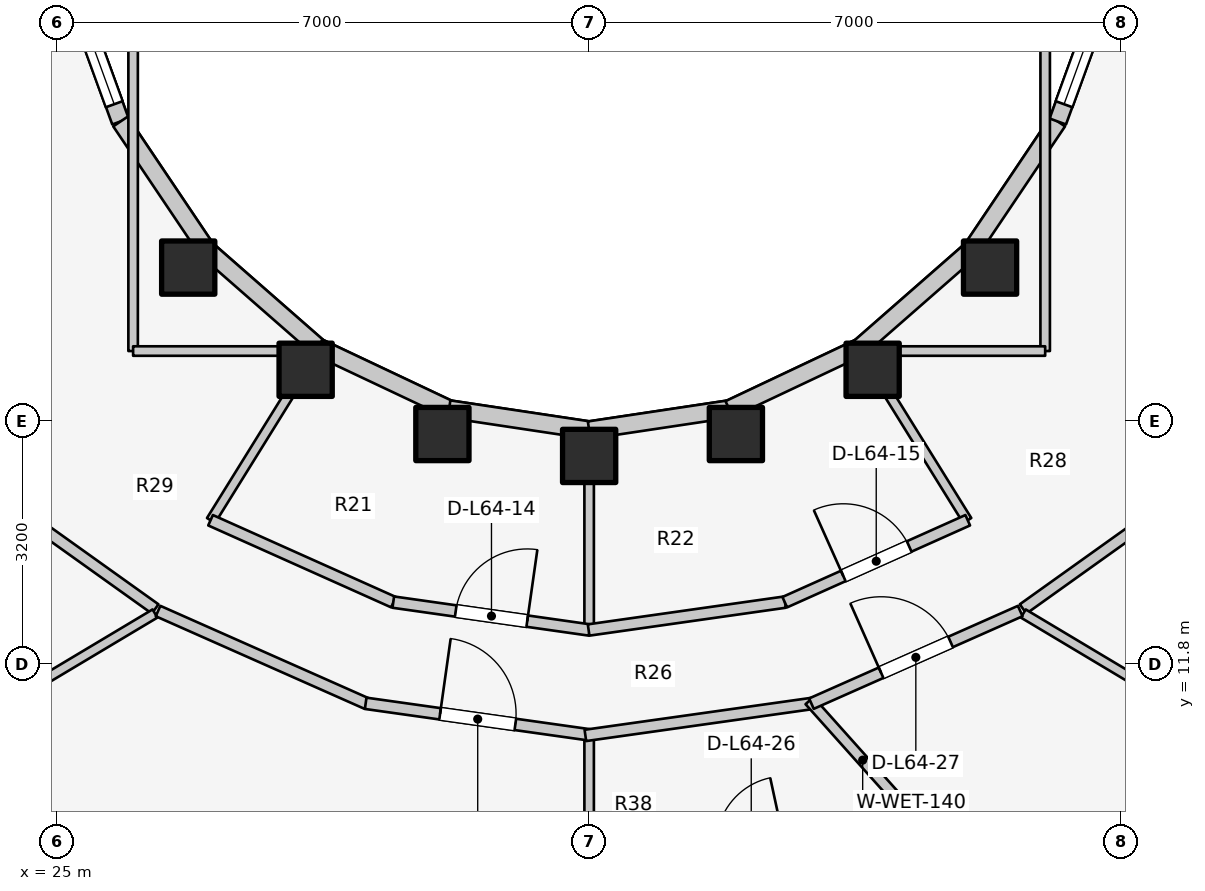
"""IFC4 building model, lengths in metres.
Left out: names, types, materials, properties, quantities, classifications, styles, units other than length and angle.
Written with IfcOpenShell. Run it as: python <this file> out.ifc"""

import sys

from ifc_helpers import new_model, si_unit, direction, frame, frame_2d, origin, origin_2d, place, context, subcontext, project, spatial, rectangle, extrude, element, fill, save


model = new_model("IFC4")
c1 = context("Model", 3, precision=1e-05, world=origin(), true_north=direction((0.0, 1.0)))
c2 = subcontext(c1, "Body", "Model", "MODEL_VIEW")
j1 = project(units=[si_unit("LENGTHUNIT", "METRE"), si_unit("PLANEANGLEUNIT", "RADIAN")], contexts=[c1])
p1 = place(None, origin())
s1 = spatial("IfcSite", under=j1, at=p1, CompositionType="ELEMENT")
p2 = place(p1, origin())
s2 = spatial("IfcBuilding", under=s1, at=p2, CompositionType="ELEMENT")
p3 = place(p2, frame((0.0, 0.0, 210.9)))
s3 = spatial("IfcBuildingStorey", under=s2, at=p3, CompositionType="ELEMENT", Elevation=210.9)
for number, where, z_axis, x_axis in (
    (1, (26.725, 17.018, 0.0), (0.0, 0.0, 1.0), (1.0, 0.0, 0.0)),
    (2, (28.27, 15.673, 0.0), (0.0, 0.0, 1.0), (1.0, 0.0, 0.0)),
    (3, (30.069, 14.828, 0.0), (0.0, 0.0, 1.0), (1.0, 0.0, 0.0)),
    (4, (32.0, 14.54, 0.0), (0.0, 0.0, 1.0), (1.0, 0.0, 0.0)),
    (5, (33.931, 14.828, 0.0), (0.0, 0.0, 1.0), (1.0, 0.0, 0.0)),
    (6, (35.73, 15.673, 0.0), (0.0, 0.0, 1.0), (1.0, 0.0, 0.0)),
    (7, (37.275, 17.018, 0.0), (0.0, 0.0, 1.0), (1.0, 0.0, 0.0)),
):
    element("IfcColumn", number, at=place(p3, frame(where, z_axis=z_axis, x_axis=x_axis)), inside=s3, PredefinedType="COLUMN", context=c2, shape_type="SweptSolid", body=[
        extrude(rectangle(XDim=0.7, YDim=0.7, at=origin_2d()), origin(), (0.0, 0.0, 1.0), 3.1),
    ])
p4 = place(p3, frame((25.123, 20.898, 0.0), z_axis=(0.0, 0.0, 1.0), x_axis=(0.341423187295, -0.93990968033, 0.0)))
e8 = element("IfcWall", 8, at=p4, inside=s3, PredefinedType="STANDARD", context=c2, shape_type="SweptSolid", body=[
    extrude(rectangle(XDim=2.084, YDim=0.23, at=frame_2d((1.042, 0.0))), origin(), (0.0, 0.0, 1.0), 2.84),
])
p5 = place(p4, frame((0.242, 0.0, 0.85)))
e9 = element("IfcOpeningElement", 9, at=p5, cuts=e8, PredefinedType="OPENING", context=c2, shape_type="SweptSolid", body=[
    extrude(rectangle(XDim=1.6, YDim=1.65, at=frame_2d((0.8, 0.825))), frame((0.0, 0.125, 0.0), z_axis=(0.0, -1.0, 0.0), x_axis=(1.0, 0.0, 0.0)), (0.0, 0.0, 1.0), 0.25),
])
p6 = place(p3, frame((25.834, 18.94, 0.0), z_axis=(0.0, 0.0, 1.0), x_axis=(0.558197800898, -0.829707909492, 0.0)))
e10 = element("IfcWall", 10, at=p6, inside=s3, PredefinedType="STANDARD", context=c2, shape_type="SweptSolid", body=[
    extrude(rectangle(XDim=2.027, YDim=0.23, at=frame_2d((1.013, 0.0))), origin(), (0.0, 0.0, 1.0), 2.16),
])
p7 = place(p3, frame((26.965, 17.258, 0.0), z_axis=(0.0, 0.0, 1.0), x_axis=(0.752576694707, -0.658504607869, 0.0)))
e11 = element("IfcWall", 11, at=p7, inside=s3, PredefinedType="STANDARD", context=c2, shape_type="SweptSolid", body=[
    extrude(rectangle(XDim=1.959, YDim=0.23, at=frame_2d((0.98, 0.0))), origin(), (0.0, 0.0, 1.0), 2.16),
])
p8 = place(p3, frame((28.44, 15.968, 0.0), z_axis=(0.0, 0.0, 1.0), x_axis=(0.904179699603, -0.427152280606, 0.0)))
e12 = element("IfcWall", 12, at=p8, inside=s3, PredefinedType="STANDARD", context=c2, shape_type="SweptSolid", body=[
    extrude(rectangle(XDim=1.899, YDim=0.23, at=frame_2d((0.95, 0.0))), origin(), (0.0, 0.0, 1.0), 2.16),
])
for number, where, z_axis, x_axis in (
    (13, (30.157, 15.157, 0.0), (0.0, 0.0, 1.0), (0.989, -0.149, 0.0)),
    (14, (32.0, 14.88, 0.0), (0.0, 0.0, 1.0), (0.989, 0.149, 0.0)),
):
    element("IfcWall", number, at=place(p3, frame(where, z_axis=z_axis, x_axis=x_axis)), inside=s3, PredefinedType="STANDARD", context=c2, shape_type="SweptSolid", body=[
        extrude(rectangle(XDim=1.864, YDim=0.23, at=frame_2d((0.932, 0.0))), origin(), (0.0, 0.0, 1.0), 2.16),
    ])
p9 = place(p3, frame((33.843, 15.157, 0.0), z_axis=(0.0, 0.0, 1.0), x_axis=(0.904179699603, 0.427152280606, 0.0)))
e15 = element("IfcWall", 15, at=p9, inside=s3, PredefinedType="STANDARD", context=c2, shape_type="SweptSolid", body=[
    extrude(rectangle(XDim=1.899, YDim=0.23, at=frame_2d((0.95, 0.0))), origin(), (0.0, 0.0, 1.0), 2.16),
])
p10 = place(p3, frame((35.56, 15.968, 0.0), z_axis=(0.0, 0.0, 1.0), x_axis=(0.752576694707, 0.658504607869, 0.0)))
e16 = element("IfcWall", 16, at=p10, inside=s3, PredefinedType="STANDARD", context=c2, shape_type="SweptSolid", body=[
    extrude(rectangle(XDim=1.959, YDim=0.23, at=frame_2d((0.98, 0.0))), origin(), (0.0, 0.0, 1.0), 2.16),
])
p11 = place(p3, frame((37.035, 17.258, 0.0), z_axis=(0.0, 0.0, 1.0), x_axis=(0.558197800898, 0.829707909492, 0.0)))
e17 = element("IfcWall", 17, at=p11, inside=s3, PredefinedType="STANDARD", context=c2, shape_type="SweptSolid", body=[
    extrude(rectangle(XDim=2.027, YDim=0.23, at=frame_2d((1.013, 0.0))), origin(), (0.0, 0.0, 1.0), 2.16),
])
p12 = place(p3, frame((38.166, 18.94, 0.0), z_axis=(0.0, 0.0, 1.0), x_axis=(0.341423187295, 0.93990968033, 0.0)))
e18 = element("IfcWall", 18, at=p12, inside=s3, PredefinedType="STANDARD", context=c2, shape_type="SweptSolid", body=[
    extrude(rectangle(XDim=2.084, YDim=0.23, at=frame_2d((1.042, 0.0))), origin(), (0.0, 0.0, 1.0), 2.84),
])
p13 = place(p12, frame((0.242, 0.0, 0.85)))
e19 = element("IfcOpeningElement", 19, at=p13, cuts=e18, PredefinedType="OPENING", context=c2, shape_type="SweptSolid", body=[
    extrude(rectangle(XDim=1.6, YDim=1.65, at=frame_2d((0.8, 0.825))), frame((0.0, 0.125, 0.0), z_axis=(0.0, -1.0, 0.0), x_axis=(1.0, 0.0, 0.0)), (0.0, 0.0, 1.0), 0.25),
])
p14 = place(p3, frame((28.45, 15.985, 0.0), z_axis=(0.0, 0.0, 1.0), x_axis=(-0.527527080983, -0.849538215049, 0.0)))
e20 = element("IfcWall", 20, at=p14, inside=s3, PredefinedType="PARTITIONING", context=c2, shape_type="SweptSolid", body=[
    extrude(rectangle(XDim=2.701, YDim=0.125, at=frame_2d((1.351, 0.0))), origin(), (0.0, 0.0, 1.0), 2.376),
])
p15 = place(p3, frame((32.0, 14.9, 0.0), z_axis=(0.0, 0.0, 1.0), x_axis=(0.0, -1.0, 0.0)))
e21 = element("IfcWall", 21, at=p15, inside=s3, PredefinedType="PARTITIONING", context=c2, shape_type="SweptSolid", body=[
    extrude(rectangle(XDim=2.65, YDim=0.125, at=frame_2d((1.325, 0.0))), origin(), (0.0, 0.0, 1.0), 2.376),
])
p16 = place(p3, frame((35.55, 15.985, 0.0), z_axis=(0.0, 0.0, 1.0), x_axis=(0.527527080983, -0.849538215049, 0.0)))
e22 = element("IfcWall", 22, at=p16, inside=s3, PredefinedType="PARTITIONING", context=c2, shape_type="SweptSolid", body=[
    extrude(rectangle(XDim=2.701, YDim=0.125, at=frame_2d((1.351, 0.0))), origin(), (0.0, 0.0, 1.0), 2.376),
])
p17 = place(p3, frame((27.019, 13.694, 0.0), z_axis=(0.0, 0.0, 1.0), x_axis=(0.912628408652, -0.408790151203, 0.0)))
e23 = element("IfcWall", 23, at=p17, inside=s3, PredefinedType="PARTITIONING", context=c2, shape_type="SweptSolid", body=[
    extrude(rectangle(XDim=2.638, YDim=0.15, at=frame_2d((1.319, 0.0))), origin(), (0.0, 0.0, 1.0), 2.376),
])
p18 = place(p3, frame((29.423, 12.617, 0.0), z_axis=(0.0, 0.0, 1.0), x_axis=(0.990078185178, -0.140517569133, 0.0)))
e24 = element("IfcWall", 24, at=p18, inside=s3, PredefinedType="PARTITIONING", context=c2, shape_type="SweptSolid", body=[
    extrude(rectangle(XDim=2.61, YDim=0.15, at=frame_2d((1.305, 0.0))), origin(), (0.0, 0.0, 1.0), 2.376),
])
p19 = place(p18, frame((0.83, 0.0, 0.0)))
e25 = element("IfcOpeningElement", 25, at=p19, cuts=e24, PredefinedType="OPENING", context=c2, shape_type="SweptSolid", body=[
    extrude(rectangle(XDim=0.95, YDim=2.1, at=frame_2d((0.475, 1.05))), frame((0.0, 0.085, 0.0), z_axis=(0.0, -1.0, 0.0), x_axis=(1.0, 0.0, 0.0)), (0.0, 0.0, 1.0), 0.17),
])
p20 = place(p3, frame((31.993, 12.25, 0.0), z_axis=(0.0, 0.0, 1.0), x_axis=(0.990078185178, 0.140517569133, 0.0)))
e26 = element("IfcWall", 26, at=p20, inside=s3, PredefinedType="PARTITIONING", context=c2, shape_type="SweptSolid", body=[
    extrude(rectangle(XDim=2.61, YDim=0.15, at=frame_2d((1.305, 0.0))), origin(), (0.0, 0.0, 1.0), 2.376),
])
p21 = place(p3, frame((34.573, 12.616, 0.0), z_axis=(0.0, 0.0, 1.0), x_axis=(0.912628408652, 0.408790151203, 0.0)))
e27 = element("IfcWall", 27, at=p21, inside=s3, PredefinedType="PARTITIONING", context=c2, shape_type="SweptSolid", body=[
    extrude(rectangle(XDim=2.638, YDim=0.15, at=frame_2d((1.319, 0.0))), origin(), (0.0, 0.0, 1.0), 2.376),
])
p22 = place(p21, frame((0.844, 0.0, 0.0)))
e28 = element("IfcOpeningElement", 28, at=p22, cuts=e27, PredefinedType="OPENING", context=c2, shape_type="SweptSolid", body=[
    extrude(rectangle(XDim=0.95, YDim=2.1, at=frame_2d((0.475, 1.05))), frame((0.0, 0.085, 0.0), z_axis=(0.0, -1.0, 0.0), x_axis=(1.0, 0.0, 0.0)), (0.0, 0.0, 1.0), 0.17),
])
p23 = place(p3, frame((26.0, 15.92, 0.0), z_axis=(0.0, 0.0, 1.0), x_axis=(0.0, 1.0, 0.0)))
e29 = element("IfcWall", 29, at=p23, inside=s3, PredefinedType="PARTITIONING", context=c2, shape_type="SweptSolid", body=[
    extrude(rectangle(XDim=4.28, YDim=0.125, at=frame_2d((2.14, 0.0))), origin(), (0.0, 0.0, 1.0), 2.232),
])
p24 = place(p3, frame((26.0, 15.92, 0.0), z_axis=(0.0, 0.0, 1.0), x_axis=(1.0, 0.0, 0.0)))
e30 = element("IfcWall", 30, at=p24, inside=s3, PredefinedType="PARTITIONING", context=c2, shape_type="SweptSolid", body=[
    extrude(rectangle(XDim=2.6, YDim=0.125, at=frame_2d((1.3, 0.0))), origin(), (0.0, 0.0, 1.0), 2.232),
])
p25 = place(p3, frame((38.0, 15.92, 0.0), z_axis=(0.0, 0.0, 1.0), x_axis=(0.0, 1.0, 0.0)))
e31 = element("IfcWall", 31, at=p25, inside=s3, PredefinedType="PARTITIONING", context=c2, shape_type="SweptSolid", body=[
    extrude(rectangle(XDim=4.28, YDim=0.125, at=frame_2d((2.14, 0.0))), origin(), (0.0, 0.0, 1.0), 2.232),
])
p26 = place(p3, frame((35.4, 15.92, 0.0), z_axis=(0.0, 0.0, 1.0), x_axis=(1.0, 0.0, 0.0)))
e32 = element("IfcWall", 32, at=p26, inside=s3, PredefinedType="PARTITIONING", context=c2, shape_type="SweptSolid", body=[
    extrude(rectangle(XDim=2.6, YDim=0.125, at=frame_2d((1.3, 0.0))), origin(), (0.0, 0.0, 1.0), 2.232),
])
for number, where, z_axis, x_axis in (
    (33, (26.29, 12.527, 0.0), (0.0, 0.0, 1.0), (-0.814, 0.581, 0.0)),
    (34, (37.71, 12.527, 0.0), (0.0, 0.0, 1.0), (0.814, 0.581, 0.0)),
):
    element("IfcWall", number, at=place(p3, frame(where, z_axis=z_axis, x_axis=x_axis)), inside=s3, PredefinedType="PARTITIONING", context=c2, shape_type="SweptSolid", body=[
        extrude(rectangle(XDim=2.082, YDim=0.15, at=frame_2d((1.041, 0.0))), origin(), (0.0, 0.0, 1.0), 2.376),
    ])
p27 = place(p3, frame((26.288, 12.467, 0.0), z_axis=(0.0, 0.0, 1.0), x_axis=(-0.858332411245, -0.513094018487, 0.0)))
e35 = element("IfcWall", 35, at=p27, inside=s3, PredefinedType="PARTITIONING", context=c2, shape_type="SweptSolid", body=[
    extrude(rectangle(XDim=6.586, YDim=0.125, at=frame_2d((3.293, 0.0))), origin(), (0.0, 0.0, 1.0), 2.376),
])
p28 = place(p3, frame((32.0, 10.815, 0.0), z_axis=(0.0, 0.0, 1.0), x_axis=(0.0, -1.0, 0.0)))
e36 = element("IfcWall", 36, at=p28, inside=s3, PredefinedType="PARTITIONING", context=c2, shape_type="SweptSolid", body=[
    extrude(rectangle(XDim=4.515, YDim=0.125, at=frame_2d((2.257, 0.0))), origin(), (0.0, 0.0, 1.0), 2.376),
])
p29 = place(p3, frame((37.712, 12.467, 0.0), z_axis=(0.0, 0.0, 1.0), x_axis=(0.858332411245, -0.513094018487, 0.0)))
e37 = element("IfcWall", 37, at=p29, inside=s3, PredefinedType="PARTITIONING", context=c2, shape_type="SweptSolid", body=[
    extrude(rectangle(XDim=6.586, YDim=0.125, at=frame_2d((3.293, 0.0))), origin(), (0.0, 0.0, 1.0), 2.376),
])
p30 = place(p3, frame((26.328, 12.499, 0.0), z_axis=(0.0, 0.0, 1.0), x_axis=(0.914139569865, -0.405399613724, 0.0)))
e38 = element("IfcWall", 38, at=p30, inside=s3, PredefinedType="PARTITIONING", context=c2, shape_type="SweptSolid", body=[
    extrude(rectangle(XDim=3.005, YDim=0.15, at=frame_2d((1.502, 0.0))), origin(), (0.0, 0.0, 1.0), 2.376),
])
p31 = place(p3, frame((29.06, 11.285, 0.0), z_axis=(0.0, 0.0, 1.0), x_axis=(0.99022315503, -0.139492305317, 0.0)))
e39 = element("IfcWall", 39, at=p31, inside=s3, PredefinedType="PARTITIONING", context=c2, shape_type="SweptSolid", body=[
    extrude(rectangle(XDim=2.977, YDim=0.15, at=frame_2d((1.489, 0.0))), origin(), (0.0, 0.0, 1.0), 2.376),
])
p32 = place(p31, frame((0.989, 0.0, 0.0)))
e40 = element("IfcOpeningElement", 40, at=p32, cuts=e39, PredefinedType="OPENING", context=c2, shape_type="SweptSolid", body=[
    extrude(rectangle(XDim=1.0, YDim=2.1, at=frame_2d((0.5, 1.05))), frame((0.0, 0.085, 0.0), z_axis=(0.0, -1.0, 0.0), x_axis=(1.0, 0.0, 0.0)), (0.0, 0.0, 1.0), 0.17),
])
p33 = place(p3, frame((31.95, 10.863, 0.0), z_axis=(0.0, 0.0, 1.0), x_axis=(0.990214091671, 0.13955662885, 0.0)))
e41 = element("IfcWall", 41, at=p33, inside=s3, PredefinedType="PARTITIONING", context=c2, shape_type="SweptSolid", body=[
    extrude(rectangle(XDim=3.062, YDim=0.15, at=frame_2d((1.531, 0.0))), origin(), (0.0, 0.0, 1.0), 2.376),
])
p34 = place(p3, frame((34.899, 11.321, 0.0), z_axis=(0.0, 0.0, 1.0), x_axis=(0.66647537222, -0.745527047279, 0.0)))
e42 = element("IfcWall", 42, at=p34, inside=s3, PredefinedType="PLUMBINGWALL", context=c2, shape_type="SweptSolid", body=[
    extrude(rectangle(XDim=2.1, YDim=0.14, at=frame_2d((1.05, 0.0))), origin(), (0.0, 0.0, 1.0), 2.385),
])
p35 = place(p3, frame((31.951, 8.859, 0.0), z_axis=(0.0, 0.0, 1.0), x_axis=(0.977405310504, 0.211373742452, 0.0)))
e43 = element("IfcWall", 43, at=p35, inside=s3, PredefinedType="PLUMBINGWALL", context=c2, shape_type="SweptSolid", body=[
    extrude(rectangle(XDim=4.464, YDim=0.14, at=frame_2d((2.232, 0.0))), origin(), (0.0, 0.0, 1.0), 2.376),
])
p36 = place(p35, frame((1.782, 0.0, 0.0)))
e44 = element("IfcOpeningElement", 44, at=p36, cuts=e43, PredefinedType="OPENING", context=c2, shape_type="SweptSolid", body=[
    extrude(rectangle(XDim=0.9, YDim=2.1, at=frame_2d((0.45, 1.05))), frame((0.0, 0.08, 0.0), z_axis=(0.0, -1.0, 0.0), x_axis=(1.0, 0.0, 0.0)), (0.0, 0.0, 1.0), 0.16),
])
p37 = place(p3, frame((34.925, 11.281, 0.0), z_axis=(0.0, 0.0, 1.0), x_axis=(0.914139569865, 0.405399613724, 0.0)))
e45 = element("IfcWall", 45, at=p37, inside=s3, PredefinedType="PARTITIONING", context=c2, shape_type="SweptSolid", body=[
    extrude(rectangle(XDim=3.005, YDim=0.15, at=frame_2d((1.502, 0.0))), origin(), (0.0, 0.0, 1.0), 2.376),
])
p38 = place(p37, frame((1.002, 0.0, 0.0)))
e46 = element("IfcOpeningElement", 46, at=p38, cuts=e45, PredefinedType="OPENING", context=c2, shape_type="SweptSolid", body=[
    extrude(rectangle(XDim=1.0, YDim=2.1, at=frame_2d((0.5, 1.05))), frame((0.0, 0.085, 0.0), z_axis=(0.0, -1.0, 0.0), x_axis=(1.0, 0.0, 0.0)), (0.0, 0.0, 1.0), 0.17),
])
p39 = place(p5, origin())
e47 = element("IfcWindow", 47, at=p39, inside=s3, PartitioningType="SINGLE_PANEL", PredefinedType="WINDOW", context=c2, shape_type="SweptSolid", body=[
    extrude(rectangle(XDim=1.6, YDim=1.65, at=frame_2d((0.8, 0.825))), frame((0.0, 0.03, 0.0), z_axis=(0.0, -1.0, 0.0), x_axis=(1.0, 0.0, 0.0)), (0.0, 0.0, 1.0), 0.06),
])
fill(e9, e47)
p40 = place(p13, origin())
e48 = element("IfcWindow", 48, at=p40, inside=s3, PartitioningType="SINGLE_PANEL", PredefinedType="WINDOW", context=c2, shape_type="SweptSolid", body=[
    extrude(rectangle(XDim=1.6, YDim=1.65, at=frame_2d((0.8, 0.825))), frame((0.0, 0.03, 0.0), z_axis=(0.0, -1.0, 0.0), x_axis=(1.0, 0.0, 0.0)), (0.0, 0.0, 1.0), 0.06),
])
fill(e19, e48)
p41 = place(p19, origin())
e49 = element("IfcDoor", 49, at=p41, inside=s3, OperationType="SINGLE_SWING_RIGHT", PredefinedType="DOOR", context=c2, shape_type="SweptSolid", body=[
    extrude(rectangle(XDim=0.95, YDim=2.1, at=frame_2d((0.475, 1.05))), frame((0.0, 0.025, 0.0), z_axis=(0.0, -1.0, 0.0), x_axis=(1.0, 0.0, 0.0)), (0.0, 0.0, 1.0), 0.05),
])
fill(e25, e49)
p42 = place(p22, origin())
e50 = element("IfcDoor", 50, at=p42, inside=s3, OperationType="SINGLE_SWING_LEFT", PredefinedType="DOOR", context=c2, shape_type="SweptSolid", body=[
    extrude(rectangle(XDim=0.95, YDim=2.1, at=frame_2d((0.475, 1.05))), frame((0.0, 0.025, 0.0), z_axis=(0.0, -1.0, 0.0), x_axis=(1.0, 0.0, 0.0)), (0.0, 0.0, 1.0), 0.05),
])
fill(e28, e50)
p43 = place(p32, origin())
e51 = element("IfcDoor", 51, at=p43, inside=s3, OperationType="SINGLE_SWING_LEFT", PredefinedType="DOOR", context=c2, shape_type="SweptSolid", body=[
    extrude(rectangle(XDim=1.0, YDim=2.1, at=frame_2d((0.5, 1.05))), frame((0.0, 0.025, 0.0), z_axis=(0.0, -1.0, 0.0), x_axis=(1.0, 0.0, 0.0)), (0.0, 0.0, 1.0), 0.05),
])
fill(e40, e51)
p44 = place(p38, origin())
e52 = element("IfcDoor", 52, at=p44, inside=s3, OperationType="SINGLE_SWING_LEFT", PredefinedType="DOOR", context=c2, shape_type="SweptSolid", body=[
    extrude(rectangle(XDim=1.0, YDim=2.1, at=frame_2d((0.5, 1.05))), frame((0.0, 0.025, 0.0), z_axis=(0.0, -1.0, 0.0), x_axis=(1.0, 0.0, 0.0)), (0.0, 0.0, 1.0), 0.05),
])
fill(e46, e52)
save(model, sys.argv[1])
